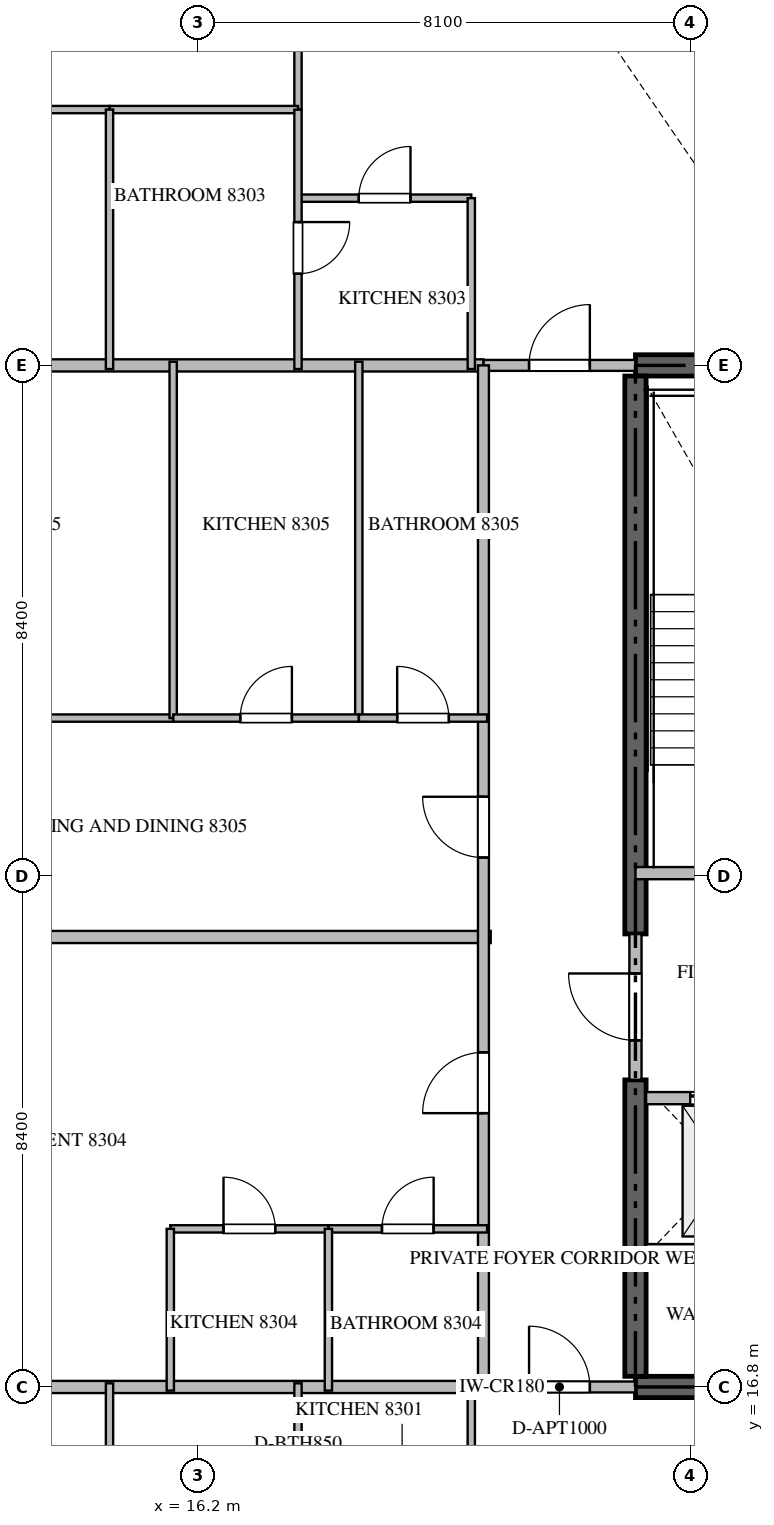
"""IFC4 building model, lengths in metres.
Left out: names, types, materials, properties, quantities, classifications, styles, units other than length and angle.
Written with IfcOpenShell. Run it as: python <this file> out.ifc"""

import sys

from ifc_helpers import new_model, si_unit, direction, frame, frame_2d, origin, place, context, subcontext, project, spatial, rectangle, extrude, source, transform, mapped, element, fill, save


model = new_model("IFC4")
c1 = context("Model", 3, precision=1e-05, world=origin(), true_north=direction((0.0, 1.0)))
c2 = subcontext(c1, "Body", "Model", "MODEL_VIEW")
j1 = project(units=[si_unit("LENGTHUNIT", "METRE"), si_unit("PLANEANGLEUNIT", "RADIAN")], contexts=[c1])
p1 = place(None, origin())
s1 = spatial("IfcSite", under=j1, at=p1, CompositionType="ELEMENT")
p2 = place(p1, origin())
s2 = spatial("IfcBuilding", under=s1, at=p2, CompositionType="ELEMENT")
p3 = place(p2, frame((0.0, 0.0, 333.95)))
s3 = spatial("IfcBuildingStorey", under=s2, at=p3, CompositionType="ELEMENT", Elevation=333.95)
for number, where, z_axis, x_axis in (
    (1, (23.4, 16.8, -0.26), (0.0, 0.0, 1.0), (1.0, 0.0, 0.0)),
    (2, (41.4, 33.6, -0.26), (0.0, 0.0, 1.0), (-1.0, 0.0, 0.0)),
):
    element("IfcWall", number, at=place(p3, frame(where, z_axis=z_axis, x_axis=x_axis)), inside=s3, PredefinedType="SHEAR", context=c2, shape_type="SweptSolid", body=[
        extrude(rectangle(XDim=18.0, YDim=0.35, at=frame_2d((9.0, 0.0))), origin(), (0.0, 0.0, 1.0), 3.868),
    ])
p4 = place(p3, frame((23.4, 16.975, -0.26), z_axis=(0.0, 0.0, 1.0), x_axis=(0.0, 1.0, 0.0)))
e3 = element("IfcWall", 3, at=p4, inside=s3, PredefinedType="SHEAR", context=c2, shape_type="SweptSolid", body=[
    extrude(rectangle(XDim=4.875, YDim=0.35, at=frame_2d((2.438, 0.0))), origin(), (0.0, 0.0, 1.0), 3.868),
])
p5 = place(p3, frame((23.4, 24.25, -0.26), z_axis=(0.0, 0.0, 1.0), x_axis=(0.0, 1.0, 0.0)))
e4 = element("IfcWall", 4, at=p5, inside=s3, PredefinedType="SHEAR", context=c2, shape_type="SweptSolid", body=[
    extrude(rectangle(XDim=9.175, YDim=0.35, at=frame_2d((4.587, 0.0))), origin(), (0.0, 0.0, 1.0), 3.868),
])
p6 = place(p3, frame((23.4, 25.25, 0.0), z_axis=(0.0, 0.0, 1.0), x_axis=(1.0, 0.0, 0.0)))
e5 = element("IfcWall", 5, at=p6, inside=s3, PredefinedType="STANDARD", context=c2, shape_type="SweptSolid", body=[
    extrude(rectangle(XDim=4.45, YDim=0.2, at=frame_2d((2.225, 0.0))), origin(), (0.0, 0.0, 1.0), 3.61),
])
p7 = place(p6, frame((1.65, 0.0, 0.0)))
e6 = element("IfcOpeningElement", 6, at=p7, cuts=e5, PredefinedType="OPENING", context=c2, shape_type="SweptSolid", body=[
    extrude(rectangle(XDim=1.1, YDim=2.15, at=frame_2d((0.55, 1.075))), frame((0.0, 0.11, 0.0), z_axis=(0.0, -1.0, 0.0), x_axis=(1.0, 0.0, 0.0)), (0.0, 0.0, 1.0), 0.22),
])
p8 = place(p3, frame((23.575, 21.55, 0.0), z_axis=(0.0, 0.0, 1.0), x_axis=(1.0, 0.0, 0.0)))
e7 = element("IfcWall", 7, at=p8, inside=s3, PredefinedType="STANDARD", context=c2, shape_type="SweptSolid", body=[
    extrude(rectangle(XDim=2.475, YDim=0.2, at=frame_2d((1.238, 0.0))), origin(), (0.0, 0.0, 1.0), 3.61),
])
p9 = place(p8, frame((0.725, 0.0, 0.0)))
e8 = element("IfcOpeningElement", 8, at=p9, cuts=e7, PredefinedType="OPENING", context=c2, shape_type="SweptSolid", body=[
    extrude(rectangle(XDim=1.2, YDim=2.2, at=frame_2d((0.6, 1.1))), frame((0.0, 0.11, 0.0), z_axis=(0.0, -1.0, 0.0), x_axis=(1.0, 0.0, 0.0)), (0.0, 0.0, 1.0), 0.22),
])
p10 = place(p3, frame((23.575, 19.05, 0.0), z_axis=(0.0, 0.0, 1.0), x_axis=(1.0, 0.0, 0.0)))
e9 = element("IfcWall", 9, at=p10, inside=s3, PredefinedType="STANDARD", context=c2, shape_type="SweptSolid", body=[
    extrude(rectangle(XDim=2.475, YDim=0.2, at=frame_2d((1.238, 0.0))), origin(), (0.0, 0.0, 1.0), 3.61),
])
p11 = place(p3, frame((23.4, 21.852, 0.0), z_axis=(0.0, 0.0, 1.0), x_axis=(0.0, 1.0, 0.0)))
e10 = element("IfcWall", 10, at=p11, inside=s3, PredefinedType="STANDARD", context=c2, shape_type="SweptSolid", body=[
    extrude(rectangle(XDim=2.396, YDim=0.2, at=frame_2d((1.198, 0.0))), origin(), (0.0, 0.0, 1.0), 3.61),
])
p12 = place(p11, frame((0.648, 0.0, 0.0)))
e11 = element("IfcOpeningElement", 11, at=p12, cuts=e10, PredefinedType="OPENING", context=c2, shape_type="SweptSolid", body=[
    extrude(rectangle(XDim=1.1, YDim=2.15, at=frame_2d((0.55, 1.075))), frame((0.0, 0.11, 0.0), z_axis=(0.0, -1.0, 0.0), x_axis=(1.0, 0.0, 0.0)), (0.0, 0.0, 1.0), 0.22),
])
p13 = place(p3, frame((9.282, 24.2, 0.0), z_axis=(0.0, 0.0, 1.0), x_axis=(1.0, 0.0, 0.0)))
e12 = element("IfcWall", 12, at=p13, inside=s3, PredefinedType="PARTITIONING", context=c2, shape_type="SweptSolid", body=[
    extrude(rectangle(XDim=11.738, YDim=0.2, at=frame_2d((5.869, 0.0))), origin(), (0.0, 0.0, 1.0), 3.61),
])
for number, where, z_axis, x_axis in (
    (13, (9.282, 16.8, 0.0), (0.0, 0.0, 1.0), (1.0, 0.0, 0.0)),
    (14, (9.282, 33.6, 0.0), (0.0, 0.0, 1.0), (1.0, 0.0, 0.0)),
):
    element("IfcWall", number, at=place(p3, frame(where, z_axis=z_axis, x_axis=x_axis)), inside=s3, PredefinedType="PARTITIONING", context=c2, shape_type="SweptSolid", body=[
        extrude(rectangle(XDim=11.618, YDim=0.2, at=frame_2d((5.809, 0.0))), origin(), (0.0, 0.0, 1.0), 3.61),
    ])
p14 = place(p3, frame((20.902, 16.8, 0.0), z_axis=(0.0, 0.0, 1.0), x_axis=(1.0, 0.0, 0.0)))
e15 = element("IfcWall", 15, at=p14, inside=s3, PredefinedType="PARTITIONING", context=c2, shape_type="SweptSolid", body=[
    extrude(rectangle(XDim=2.496, YDim=0.18, at=frame_2d((1.248, 0.0))), origin(), (0.0, 0.0, 1.0), 3.61),
])
p15 = place(p14, frame((0.748, 0.0, 0.0)))
e16 = element("IfcOpeningElement", 16, at=p15, cuts=e15, PredefinedType="OPENING", context=c2, shape_type="SweptSolid", body=[
    extrude(rectangle(XDim=1.0, YDim=2.15, at=frame_2d((0.5, 1.075))), frame((0.0, 0.1, 0.0), z_axis=(0.0, -1.0, 0.0), x_axis=(1.0, 0.0, 0.0)), (0.0, 0.0, 1.0), 0.2),
])
p16 = place(p3, frame((20.902, 33.6, 0.0), z_axis=(0.0, 0.0, 1.0), x_axis=(1.0, 0.0, 0.0)))
e17 = element("IfcWall", 17, at=p16, inside=s3, PredefinedType="PARTITIONING", context=c2, shape_type="SweptSolid", body=[
    extrude(rectangle(XDim=2.496, YDim=0.18, at=frame_2d((1.248, 0.0))), origin(), (0.0, 0.0, 1.0), 3.61),
])
p17 = place(p16, frame((0.748, 0.0, 0.0)))
e18 = element("IfcOpeningElement", 18, at=p17, cuts=e17, PredefinedType="OPENING", context=c2, shape_type="SweptSolid", body=[
    extrude(rectangle(XDim=1.0, YDim=2.15, at=frame_2d((0.5, 1.075))), frame((0.0, 0.1, 0.0), z_axis=(0.0, -1.0, 0.0), x_axis=(1.0, 0.0, 0.0)), (0.0, 0.0, 1.0), 0.2),
])
p18 = place(p3, frame((20.9, 16.8, 0.0), z_axis=(0.0, 0.0, 1.0), x_axis=(0.0, 1.0, 0.0)))
e19 = element("IfcWall", 19, at=p18, inside=s3, PredefinedType="PARTITIONING", context=c2, shape_type="SweptSolid", body=[
    extrude(rectangle(XDim=16.8, YDim=0.18, at=frame_2d((8.4, 0.0))), origin(), (0.0, 0.0, 1.0), 3.61),
])
p19 = place(p18, frame((4.503, 0.0, 0.0)))
e20 = element("IfcOpeningElement", 20, at=p19, cuts=e19, PredefinedType="OPENING", context=c2, shape_type="SweptSolid", body=[
    extrude(rectangle(XDim=1.0, YDim=2.15, at=frame_2d((0.5, 1.075))), frame((0.0, 0.1, 0.0), z_axis=(0.0, -1.0, 0.0), x_axis=(1.0, 0.0, 0.0)), (0.0, 0.0, 1.0), 0.2),
])
p20 = place(p18, frame((8.706, 0.0, 0.0)))
e21 = element("IfcOpeningElement", 21, at=p20, cuts=e19, PredefinedType="OPENING", context=c2, shape_type="SweptSolid", body=[
    extrude(rectangle(XDim=1.0, YDim=2.15, at=frame_2d((0.5, 1.075))), frame((0.0, 0.1, 0.0), z_axis=(0.0, -1.0, 0.0), x_axis=(1.0, 0.0, 0.0)), (0.0, 0.0, 1.0), 0.2),
])
p21 = place(p3, frame((20.7, 14.05, 0.0), z_axis=(0.0, 0.0, 1.0), x_axis=(0.0, 1.0, 0.0)))
e22 = element("IfcWall", 22, at=p21, inside=s3, PredefinedType="PARTITIONING", context=c2, shape_type="SweptSolid", body=[
    extrude(rectangle(XDim=2.81, YDim=0.12, at=frame_2d((1.405, 0.0))), origin(), (0.0, 0.0, 1.0), 3.61),
])
p22 = place(p3, frame((14.75, 12.593, 0.0), z_axis=(0.0, 0.0, 1.0), x_axis=(0.0, 1.0, 0.0)))
e23 = element("IfcWall", 23, at=p22, inside=s3, PredefinedType="PARTITIONING", context=c2, shape_type="SweptSolid", body=[
    extrude(rectangle(XDim=4.267, YDim=0.12, at=frame_2d((2.134, 0.0))), origin(), (0.0, 0.0, 1.0), 3.61),
])
p23 = place(p3, frame((17.85, 12.595, 0.0), z_axis=(0.0, 0.0, 1.0), x_axis=(0.0, 1.0, 0.0)))
e24 = element("IfcWall", 24, at=p23, inside=s3, PredefinedType="PARTITIONING", context=c2, shape_type="SweptSolid", body=[
    extrude(rectangle(XDim=4.265, YDim=0.12, at=frame_2d((2.133, 0.0))), origin(), (0.0, 0.0, 1.0), 2.445),
])
p24 = place(p23, frame((1.847, 0.0, 0.0)))
e25 = element("IfcOpeningElement", 25, at=p24, cuts=e24, PredefinedType="OPENING", context=c2, shape_type="SweptSolid", body=[
    extrude(rectangle(XDim=0.85, YDim=2.1, at=frame_2d((0.425, 1.05))), frame((0.0, 0.07, 0.0), z_axis=(0.0, -1.0, 0.0), x_axis=(1.0, 0.0, 0.0)), (0.0, 0.0, 1.0), 0.14),
])
p25 = place(p3, frame((17.85, 36.35, 0.0), z_axis=(0.0, 0.0, 1.0), x_axis=(1.0, 0.0, 0.0)))
e26 = element("IfcWall", 26, at=p25, inside=s3, PredefinedType="PARTITIONING", context=c2, shape_type="SweptSolid", body=[
    extrude(rectangle(XDim=2.85, YDim=0.12, at=frame_2d((1.425, 0.0))), origin(), (0.0, 0.0, 1.0), 3.332),
])
p26 = place(p25, frame((1.0, 0.0, 0.0)))
e27 = element("IfcOpeningElement", 27, at=p26, cuts=e26, PredefinedType="OPENING", context=c2, shape_type="SweptSolid", body=[
    extrude(rectangle(XDim=0.85, YDim=2.1, at=frame_2d((0.425, 1.05))), frame((0.0, 0.07, 0.0), z_axis=(0.0, -1.0, 0.0), x_axis=(1.0, 0.0, 0.0)), (0.0, 0.0, 1.0), 0.14),
])
p27 = place(p3, frame((20.7, 36.35, 0.0), z_axis=(0.0, 0.0, 1.0), x_axis=(0.0, -1.0, 0.0)))
e28 = element("IfcWall", 28, at=p27, inside=s3, PredefinedType="PARTITIONING", context=c2, shape_type="SweptSolid", body=[
    extrude(rectangle(XDim=2.81, YDim=0.12, at=frame_2d((1.405, 0.0))), origin(), (0.0, 0.0, 1.0), 3.61),
])
p28 = place(p3, frame((17.85, 47.905, 0.0), z_axis=(0.0, 0.0, 1.0), x_axis=(0.0, -1.0, 0.0)))
e29 = element("IfcWall", 29, at=p28, inside=s3, PredefinedType="PARTITIONING", context=c2, shape_type="SweptSolid", body=[
    extrude(rectangle(XDim=10.098, YDim=0.12, at=frame_2d((5.049, 0.0))), origin(), (0.0, 0.0, 1.0), 2.445),
])
p29 = place(p28, frame((5.059, 0.0, 0.0)))
e30 = element("IfcOpeningElement", 30, at=p29, cuts=e29, PredefinedType="OPENING", context=c2, shape_type="SweptSolid", body=[
    extrude(rectangle(XDim=0.9, YDim=2.1, at=frame_2d((0.45, 1.05))), frame((0.0, 0.07, 0.0), z_axis=(0.0, -1.0, 0.0), x_axis=(1.0, 0.0, 0.0)), (0.0, 0.0, 1.0), 0.14),
])
p30 = place(p3, frame((9.295, 37.807, 0.0), z_axis=(0.0, 0.0, 1.0), x_axis=(1.0, 0.0, 0.0)))
e31 = element("IfcWall", 31, at=p30, inside=s3, PredefinedType="PARTITIONING", context=c2, shape_type="SweptSolid", body=[
    extrude(rectangle(XDim=5.455, YDim=0.12, at=frame_2d((2.728, 0.0))), origin(), (0.0, 0.0, 1.0), 3.61),
])
p31 = place(p30, frame((3.224, 0.0, 0.0)))
e32 = element("IfcOpeningElement", 32, at=p31, cuts=e31, PredefinedType="OPENING", context=c2, shape_type="SweptSolid", body=[
    extrude(rectangle(XDim=0.85, YDim=2.1, at=frame_2d((0.425, 1.05))), frame((0.0, 0.07, 0.0), z_axis=(0.0, -1.0, 0.0), x_axis=(1.0, 0.0, 0.0)), (0.0, 0.0, 1.0), 0.14),
])
p32 = place(p3, frame((14.752, 37.807, 0.0), z_axis=(0.0, 0.0, 1.0), x_axis=(1.0, 0.0, 0.0)))
e33 = element("IfcWall", 33, at=p32, inside=s3, PredefinedType="PARTITIONING", context=c2, shape_type="SweptSolid", body=[
    extrude(rectangle(XDim=3.098, YDim=0.12, at=frame_2d((1.549, 0.0))), origin(), (0.0, 0.0, 1.0), 3.61),
])
p33 = place(p3, frame((14.75, 37.807, 0.0), z_axis=(0.0, 0.0, 1.0), x_axis=(0.0, -1.0, 0.0)))
e34 = element("IfcWall", 34, at=p33, inside=s3, PredefinedType="PARTITIONING", context=c2, shape_type="SweptSolid", body=[
    extrude(rectangle(XDim=4.267, YDim=0.12, at=frame_2d((2.133, 0.0))), origin(), (0.0, 0.0, 1.0), 3.61),
])
p34 = place(p3, frame((17.85, 37.805, 0.0), z_axis=(0.0, 0.0, 1.0), x_axis=(0.0, -1.0, 0.0)))
e35 = element("IfcWall", 35, at=p34, inside=s3, PredefinedType="PARTITIONING", context=c2, shape_type="SweptSolid", body=[
    extrude(rectangle(XDim=4.265, YDim=0.12, at=frame_2d((2.132, 0.0))), origin(), (0.0, 0.0, 1.0), 2.445),
])
p35 = place(p34, frame((1.848, 0.0, 0.0)))
e36 = element("IfcOpeningElement", 36, at=p35, cuts=e35, PredefinedType="OPENING", context=c2, shape_type="SweptSolid", body=[
    extrude(rectangle(XDim=0.85, YDim=2.1, at=frame_2d((0.425, 1.05))), frame((0.0, 0.07, 0.0), z_axis=(0.0, -1.0, 0.0), x_axis=(1.0, 0.0, 0.0)), (0.0, 0.0, 1.0), 0.14),
])
p36 = place(p3, frame((15.75, 19.4, 0.0), z_axis=(0.0, 0.0, 1.0), x_axis=(1.0, 0.0, 0.0)))
e37 = element("IfcWall", 37, at=p36, inside=s3, PredefinedType="PARTITIONING", context=c2, shape_type="SweptSolid", body=[
    extrude(rectangle(XDim=2.6, YDim=0.12, at=frame_2d((1.3, 0.0))), origin(), (0.0, 0.0, 1.0), 3.61),
])
p37 = place(p36, frame((0.875, 0.0, 0.0)))
e38 = element("IfcOpeningElement", 38, at=p37, cuts=e37, PredefinedType="OPENING", context=c2, shape_type="SweptSolid", body=[
    extrude(rectangle(XDim=0.85, YDim=2.1, at=frame_2d((0.425, 1.05))), frame((0.0, 0.07, 0.0), z_axis=(0.0, -1.0, 0.0), x_axis=(1.0, 0.0, 0.0)), (0.0, 0.0, 1.0), 0.14),
])
p38 = place(p3, frame((18.352, 19.4, 0.0), z_axis=(0.0, 0.0, 1.0), x_axis=(1.0, 0.0, 0.0)))
e39 = element("IfcWall", 39, at=p38, inside=s3, PredefinedType="PARTITIONING", context=c2, shape_type="SweptSolid", body=[
    extrude(rectangle(XDim=2.608, YDim=0.12, at=frame_2d((1.304, 0.0))), origin(), (0.0, 0.0, 1.0), 3.61),
])
p39 = place(p38, frame((0.879, 0.0, 0.0)))
e40 = element("IfcOpeningElement", 40, at=p39, cuts=e39, PredefinedType="OPENING", context=c2, shape_type="SweptSolid", body=[
    extrude(rectangle(XDim=0.85, YDim=2.1, at=frame_2d((0.425, 1.05))), frame((0.0, 0.07, 0.0), z_axis=(0.0, -1.0, 0.0), x_axis=(1.0, 0.0, 0.0)), (0.0, 0.0, 1.0), 0.14),
])
for number, where, z_axis, x_axis in (
    (41, (18.35, 16.74, 0.0), (0.0, 0.0, 1.0), (0.0, 1.0, 0.0)),
    (42, (15.75, 16.74, 0.0), (0.0, 0.0, 1.0), (0.0, 1.0, 0.0)),
):
    element("IfcWall", number, at=place(p3, frame(where, z_axis=z_axis, x_axis=x_axis)), inside=s3, PredefinedType="PARTITIONING", context=c2, shape_type="SweptSolid", body=[
        extrude(rectangle(XDim=2.66, YDim=0.12, at=frame_2d((1.33, 0.0))), origin(), (0.0, 0.0, 1.0), 3.61),
    ])
p40 = place(p3, frame((9.295, 27.8, 0.0), z_axis=(0.0, 0.0, 1.0), x_axis=(1.0, 0.0, 0.0)))
e43 = element("IfcWall", 43, at=p40, inside=s3, PredefinedType="PARTITIONING", context=c2, shape_type="SweptSolid", body=[
    extrude(rectangle(XDim=6.502, YDim=0.12, at=frame_2d((3.251, 0.0))), origin(), (0.0, 0.0, 1.0), 3.61),
])
p41 = place(p40, frame((3.081, 0.0, 0.0)))
e44 = element("IfcOpeningElement", 44, at=p41, cuts=e43, PredefinedType="OPENING", context=c2, shape_type="SweptSolid", body=[
    extrude(rectangle(XDim=0.9, YDim=2.1, at=frame_2d((0.45, 1.05))), frame((0.0, 0.07, 0.0), z_axis=(0.0, -1.0, 0.0), x_axis=(1.0, 0.0, 0.0)), (0.0, 0.0, 1.0), 0.14),
])
for number, where, z_axis, x_axis in (
    (45, (15.797, 27.8, 0.0), (0.0, 0.0, 1.0), (0.0, 1.0, 0.0)),
    (46, (18.85, 27.8, 0.0), (0.0, 0.0, 1.0), (0.0, 1.0, 0.0)),
):
    element("IfcWall", number, at=place(p3, frame(where, z_axis=z_axis, x_axis=x_axis)), inside=s3, PredefinedType="PARTITIONING", context=c2, shape_type="SweptSolid", body=[
        extrude(rectangle(XDim=5.86, YDim=0.12, at=frame_2d((2.93, 0.0))), origin(), (0.0, 0.0, 1.0), 3.61),
    ])
p42 = place(p3, frame((15.799, 27.8, 0.0), z_axis=(0.0, 0.0, 1.0), x_axis=(1.0, 0.0, 0.0)))
e47 = element("IfcWall", 47, at=p42, inside=s3, PredefinedType="PARTITIONING", context=c2, shape_type="SweptSolid", body=[
    extrude(rectangle(XDim=3.051, YDim=0.12, at=frame_2d((1.525, 0.0))), origin(), (0.0, 0.0, 1.0), 3.61),
])
p43 = place(p42, frame((1.101, 0.0, 0.0)))
e48 = element("IfcOpeningElement", 48, at=p43, cuts=e47, PredefinedType="OPENING", context=c2, shape_type="SweptSolid", body=[
    extrude(rectangle(XDim=0.85, YDim=2.1, at=frame_2d((0.425, 1.05))), frame((0.0, 0.07, 0.0), z_axis=(0.0, -1.0, 0.0), x_axis=(1.0, 0.0, 0.0)), (0.0, 0.0, 1.0), 0.14),
])
p44 = place(p3, frame((18.852, 27.8, 0.0), z_axis=(0.0, 0.0, 1.0), x_axis=(1.0, 0.0, 0.0)))
e49 = element("IfcWall", 49, at=p44, inside=s3, PredefinedType="PARTITIONING", context=c2, shape_type="SweptSolid", body=[
    extrude(rectangle(XDim=2.108, YDim=0.12, at=frame_2d((1.054, 0.0))), origin(), (0.0, 0.0, 1.0), 3.61),
])
p45 = place(p44, frame((0.629, 0.0, 0.0)))
e50 = element("IfcOpeningElement", 50, at=p45, cuts=e49, PredefinedType="OPENING", context=c2, shape_type="SweptSolid", body=[
    extrude(rectangle(XDim=0.85, YDim=2.1, at=frame_2d((0.425, 1.05))), frame((0.0, 0.07, 0.0), z_axis=(0.0, -1.0, 0.0), x_axis=(1.0, 0.0, 0.0)), (0.0, 0.0, 1.0), 0.14),
])
m1 = source(origin(), c2, "Body", "SweptSolid", [
    extrude(rectangle(XDim=1.2, YDim=2.2, at=frame_2d((0.6, 1.1))), frame((0.0, 0.025, 0.0), z_axis=(0.0, -1.0, 0.0), x_axis=(1.0, 0.0, 0.0)), (0.0, 0.0, 1.0), 0.05),
])
p46 = place(p9, origin())
e51 = element("IfcDoor", 51, at=p46, inside=s3, OperationType="DOUBLE_DOOR_SLIDING", PredefinedType="DOOR", context=c2, shape_type="MappedRepresentation", body=[
    mapped(m1, transform((0.0, 0.0, 0.0), scale=1.0)),
])
fill(e8, e51)
m2 = source(origin(), c2, "Body", "SweptSolid", [
    extrude(rectangle(XDim=1.1, YDim=2.15, at=frame_2d((0.55, 1.075))), frame((0.0, 0.025, 0.0), z_axis=(0.0, -1.0, 0.0), x_axis=(1.0, 0.0, 0.0)), (0.0, 0.0, 1.0), 0.05),
])
p47 = place(p12, origin())
e52 = element("IfcDoor", 52, at=p47, inside=s3, OperationType="SINGLE_SWING_RIGHT", PredefinedType="DOOR", context=c2, shape_type="MappedRepresentation", body=[
    mapped(m2, transform((0.0, 0.0, 0.0), scale=1.0)),
])
fill(e11, e52)
m3 = source(origin(), c2, "Body", "SweptSolid", [
    extrude(rectangle(XDim=1.0, YDim=2.15, at=frame_2d((0.5, 1.075))), frame((0.0, 0.025, 0.0), z_axis=(0.0, -1.0, 0.0), x_axis=(1.0, 0.0, 0.0)), (0.0, 0.0, 1.0), 0.05),
])
p48 = place(p15, origin())
e53 = element("IfcDoor", 53, at=p48, inside=s3, OperationType="SINGLE_SWING_LEFT", PredefinedType="DOOR", context=c2, shape_type="MappedRepresentation", body=[
    mapped(m3, transform((0.0, 0.0, 0.0), scale=1.0)),
])
fill(e16, e53)
p49 = place(p17, origin())
e54 = element("IfcDoor", 54, at=p49, inside=s3, OperationType="SINGLE_SWING_RIGHT", PredefinedType="DOOR", context=c2, shape_type="MappedRepresentation", body=[
    mapped(m3, transform((0.0, 0.0, 0.0), scale=1.0)),
])
fill(e18, e54)
p50 = place(p19, origin())
e55 = element("IfcDoor", 55, at=p50, inside=s3, OperationType="SINGLE_SWING_LEFT", PredefinedType="DOOR", context=c2, shape_type="MappedRepresentation", body=[
    mapped(m3, transform((0.0, 0.0, 0.0), scale=1.0)),
])
fill(e20, e55)
p51 = place(p20, origin())
e56 = element("IfcDoor", 56, at=p51, inside=s3, OperationType="SINGLE_SWING_RIGHT", PredefinedType="DOOR", context=c2, shape_type="MappedRepresentation", body=[
    mapped(m3, transform((0.0, 0.0, 0.0), scale=1.0)),
])
fill(e21, e56)
m4 = source(origin(), c2, "Body", "SweptSolid", [
    extrude(rectangle(XDim=0.85, YDim=2.1, at=frame_2d((0.425, 1.05))), frame((0.0, 0.025, 0.0), z_axis=(0.0, -1.0, 0.0), x_axis=(1.0, 0.0, 0.0)), (0.0, 0.0, 1.0), 0.05),
])
p52 = place(p26, origin())
e57 = element("IfcDoor", 57, at=p52, inside=s3, OperationType="SINGLE_SWING_RIGHT", PredefinedType="DOOR", context=c2, shape_type="MappedRepresentation", body=[
    mapped(m4, transform((0.0, 0.0, 0.0), scale=1.0)),
])
fill(e27, e57)
p53 = place(p35, origin())
e58 = element("IfcDoor", 58, at=p53, inside=s3, OperationType="SINGLE_SWING_LEFT", PredefinedType="DOOR", context=c2, shape_type="MappedRepresentation", body=[
    mapped(m4, transform((0.0, 0.0, 0.0), scale=1.0)),
])
fill(e36, e58)
p54 = place(p37, origin())
e59 = element("IfcDoor", 59, at=p54, inside=s3, OperationType="SINGLE_SWING_LEFT", PredefinedType="DOOR", context=c2, shape_type="MappedRepresentation", body=[
    mapped(m4, transform((0.0, 0.0, 0.0), scale=1.0)),
])
fill(e38, e59)
p55 = place(p39, origin())
e60 = element("IfcDoor", 60, at=p55, inside=s3, OperationType="SINGLE_SWING_RIGHT", PredefinedType="DOOR", context=c2, shape_type="MappedRepresentation", body=[
    mapped(m4, transform((0.0, 0.0, 0.0), scale=1.0)),
])
fill(e40, e60)
p56 = place(p43, origin())
e61 = element("IfcDoor", 61, at=p56, inside=s3, OperationType="SINGLE_SWING_RIGHT", PredefinedType="DOOR", context=c2, shape_type="MappedRepresentation", body=[
    mapped(m4, transform((0.0, 0.0, 0.0), scale=1.0)),
])
fill(e48, e61)
p57 = place(p45, origin())
e62 = element("IfcDoor", 62, at=p57, inside=s3, OperationType="SINGLE_SWING_LEFT", PredefinedType="DOOR", context=c2, shape_type="MappedRepresentation", body=[
    mapped(m4, transform((0.0, 0.0, 0.0), scale=1.0)),
])
fill(e50, e62)
save(model, sys.argv[1])
